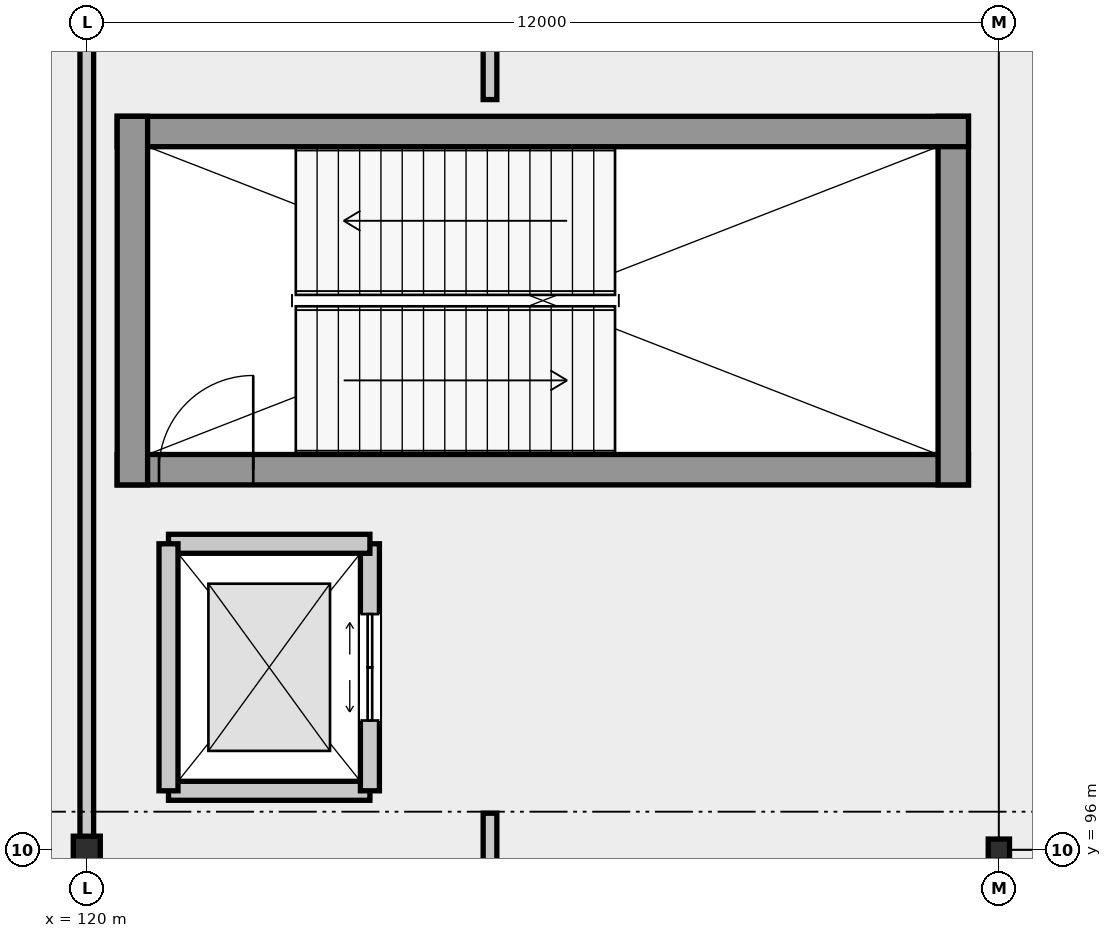
"""IFC4 building model, lengths in metres.
Left out: names, types, materials, properties, quantities, classifications, styles, units other than length and angle.
Written with IfcOpenShell. Run it as: python <this file> out.ifc"""

import sys

from ifc_helpers import new_model, si_unit, direction, frame, frame_2d, origin, origin_2d, place, context, subcontext, project, spatial, rectangle, hollow_circle, i_section, extrude, element, fill, save


model = new_model("IFC4")
c1 = context("Model", 3, precision=1e-05, world=origin(), true_north=direction((0.0, 1.0)))
c2 = subcontext(c1, "Body", "Model", "MODEL_VIEW")
j1 = project(units=[si_unit("LENGTHUNIT", "METRE"), si_unit("PLANEANGLEUNIT", "RADIAN")], contexts=[c1])
p1 = place(None, origin())
s1 = spatial("IfcSite", under=j1, at=p1, CompositionType="ELEMENT")
p2 = place(p1, origin())
s2 = spatial("IfcBuilding", under=s1, at=p2, CompositionType="ELEMENT")
p3 = place(p2, frame((0.0, 0.0, 10.8)))
s3 = spatial("IfcBuildingStorey", under=s2, at=p3, CompositionType="ELEMENT", Elevation=10.8)
p4 = place(p3, frame((120.0, 96.0, 0.0), z_axis=(0.0, 0.0, 1.0), x_axis=(1.0, 0.0, 0.0)))
e1 = element("IfcColumn", 1, at=p4, inside=s3, PredefinedType="COLUMN", context=c2, shape_type="SweptSolid", body=[
    extrude(hollow_circle(Radius=0.178, WallThickness=0.016, at=origin_2d()), origin(), (0.0, 0.0, 1.0), 6.0),
])
p5 = place(p3, frame((132.0, 96.0, 0.0), z_axis=(0.0, 0.0, 1.0), x_axis=(1.0, 0.0, 0.0)))
e2 = element("IfcColumn", 2, at=p5, inside=s3, PredefinedType="COLUMN", context=c2, shape_type="SweptSolid", body=[
    extrude(i_section(OverallWidth=0.28, OverallDepth=0.28, WebThickness=0.01, FlangeThickness=0.018, FilletRadius=0.024, at=origin_2d()), origin(), (0.0, 0.0, 1.0), 6.0),
])
p6 = place(p3, frame((120.4, 101.0, 0.0), z_axis=(0.0, 0.0, 1.0), x_axis=(1.0, 0.0, 0.0)))
e3 = element("IfcWall", 3, at=p6, inside=s3, PredefinedType="SHEAR", context=c2, shape_type="SweptSolid", body=[
    extrude(rectangle(XDim=11.2, YDim=0.4, at=frame_2d((5.6, 0.0))), origin(), (0.0, 0.0, 1.0), 5.69),
])
p7 = place(p6, frame((0.55, 0.0, 0.0)))
e4 = element("IfcOpeningElement", 4, at=p7, cuts=e3, PredefinedType="OPENING", context=c2, shape_type="SweptSolid", body=[
    extrude(rectangle(XDim=1.24, YDim=2.25, at=frame_2d((0.62, 1.125))), frame((0.0, 0.21, 0.0), z_axis=(0.0, -1.0, 0.0), x_axis=(1.0, 0.0, 0.0)), (0.0, 0.0, 1.0), 0.42),
])
p8 = place(p3, frame((131.4, 100.8, 0.0), z_axis=(0.0, 0.0, 1.0), x_axis=(0.0, 1.0, 0.0)))
e5 = element("IfcWall", 5, at=p8, inside=s3, PredefinedType="SHEAR", context=c2, shape_type="SweptSolid", body=[
    extrude(rectangle(XDim=4.85, YDim=0.4, at=frame_2d((2.425, 0.0))), origin(), (0.0, 0.0, 1.0), 5.69),
])
p9 = place(p3, frame((131.6, 105.45, 0.0), z_axis=(0.0, 0.0, 1.0), x_axis=(-1.0, 0.0, 0.0)))
e6 = element("IfcWall", 6, at=p9, inside=s3, PredefinedType="SHEAR", context=c2, shape_type="SweptSolid", body=[
    extrude(rectangle(XDim=11.2, YDim=0.4, at=frame_2d((5.6, 0.0))), origin(), (0.0, 0.0, 1.0), 5.69),
])
p10 = place(p3, frame((120.6, 105.65, 0.0), z_axis=(0.0, 0.0, 1.0), x_axis=(0.0, -1.0, 0.0)))
e7 = element("IfcWall", 7, at=p10, inside=s3, PredefinedType="SHEAR", context=c2, shape_type="SweptSolid", body=[
    extrude(rectangle(XDim=4.85, YDim=0.4, at=frame_2d((2.425, 0.0))), origin(), (0.0, 0.0, 1.0), 5.69),
])
p11 = place(p3, frame((121.075, 96.775, 0.0), z_axis=(0.0, 0.0, 1.0), x_axis=(1.0, 0.0, 0.0)))
e8 = element("IfcWall", 8, at=p11, inside=s3, PredefinedType="SOLIDWALL", context=c2, shape_type="SweptSolid", body=[
    extrude(rectangle(XDim=2.65, YDim=0.25, at=frame_2d((1.325, 0.0))), origin(), (0.0, 0.0, 1.0), 5.69),
])
p12 = place(p3, frame((123.725, 96.775, 0.0), z_axis=(0.0, 0.0, 1.0), x_axis=(0.0, 1.0, 0.0)))
e9 = element("IfcWall", 9, at=p12, inside=s3, PredefinedType="SOLIDWALL", context=c2, shape_type="SweptSolid", body=[
    extrude(rectangle(XDim=3.25, YDim=0.25, at=frame_2d((1.625, 0.0))), origin(), (0.0, 0.0, 1.0), 5.69),
])
p13 = place(p12, frame((0.925, 0.0, 0.0)))
e10 = element("IfcOpeningElement", 10, at=p13, cuts=e9, PredefinedType="OPENING", context=c2, shape_type="SweptSolid", body=[
    extrude(rectangle(XDim=1.4, YDim=2.3, at=frame_2d((0.7, 1.15))), frame((0.0, 0.135, 0.0), z_axis=(0.0, -1.0, 0.0), x_axis=(1.0, 0.0, 0.0)), (0.0, 0.0, 1.0), 0.27),
])
p14 = place(p3, frame((123.725, 100.025, 0.0), z_axis=(0.0, 0.0, 1.0), x_axis=(-1.0, 0.0, 0.0)))
e11 = element("IfcWall", 11, at=p14, inside=s3, PredefinedType="SOLIDWALL", context=c2, shape_type="SweptSolid", body=[
    extrude(rectangle(XDim=2.65, YDim=0.25, at=frame_2d((1.325, 0.0))), origin(), (0.0, 0.0, 1.0), 5.69),
])
p15 = place(p3, frame((121.075, 100.025, 0.0), z_axis=(0.0, 0.0, 1.0), x_axis=(0.0, -1.0, 0.0)))
e12 = element("IfcWall", 12, at=p15, inside=s3, PredefinedType="SOLIDWALL", context=c2, shape_type="SweptSolid", body=[
    extrude(rectangle(XDim=3.25, YDim=0.25, at=frame_2d((1.625, 0.0))), origin(), (0.0, 0.0, 1.0), 5.69),
])
p16 = place(p3, frame((120.0, 84.594, 0.0), z_axis=(0.0, 0.0, 1.0), x_axis=(0.0, 1.0, 0.0)))
e13 = element("IfcWall", 13, at=p16, inside=s3, PredefinedType="PARTITIONING", context=c2, shape_type="SweptSolid", body=[
    extrude(rectangle(XDim=22.848, YDim=0.18, at=frame_2d((11.424, 0.0))), origin(), (0.0, 0.0, 1.0), 5.18),
])
p17 = place(p16, frame((4.452, 0.0, 0.0)))
e14 = element("IfcOpeningElement", 14, at=p17, cuts=e13, PredefinedType="OPENING", context=c2, shape_type="SweptSolid", body=[
    extrude(rectangle(XDim=1.15, YDim=2.25, at=frame_2d((0.575, 1.125))), frame((0.0, 0.1, 0.0), z_axis=(0.0, -1.0, 0.0), x_axis=(1.0, 0.0, 0.0)), (0.0, 0.0, 1.0), 0.2),
])
p18 = place(p3, frame((125.305, 93.87, 0.0), z_axis=(0.0, 0.0, 1.0), x_axis=(0.0, 1.0, 0.0)))
e15 = element("IfcWall", 15, at=p18, inside=s3, PredefinedType="PARTITIONING", context=c2, shape_type="SweptSolid", body=[
    extrude(rectangle(XDim=2.61, YDim=0.18, at=frame_2d((1.305, 0.0))), origin(), (0.0, 0.0, 1.0), 5.18),
])
p19 = place(p18, frame((0.65, 0.0, 0.0)))
e16 = element("IfcOpeningElement", 16, at=p19, cuts=e15, PredefinedType="OPENING", context=c2, shape_type="SweptSolid", body=[
    extrude(rectangle(XDim=0.92, YDim=2.15, at=frame_2d((0.46, 1.075))), frame((0.0, 0.1, 0.0), z_axis=(0.0, -1.0, 0.0), x_axis=(1.0, 0.0, 0.0)), (0.0, 0.0, 1.0), 0.2),
])
p20 = place(p3, frame((125.305, 105.87, 0.0), z_axis=(0.0, 0.0, 1.0), x_axis=(0.0, 1.0, 0.0)))
e17 = element("IfcWall", 17, at=p20, inside=s3, PredefinedType="PARTITIONING", context=c2, shape_type="SweptSolid", body=[
    extrude(rectangle(XDim=1.75, YDim=0.18, at=frame_2d((0.875, 0.0))), origin(), (0.0, 0.0, 1.0), 5.67),
])
p21 = place(p7, origin())
e18 = element("IfcDoor", 18, at=p21, inside=s3, OperationType="SINGLE_SWING_RIGHT", PredefinedType="DOOR", context=c2, shape_type="SweptSolid", body=[
    extrude(rectangle(XDim=1.24, YDim=2.25, at=frame_2d((0.62, 1.125))), frame((0.0, 0.025, 0.0), z_axis=(0.0, -1.0, 0.0), x_axis=(1.0, 0.0, 0.0)), (0.0, 0.0, 1.0), 0.05),
])
fill(e4, e18)
p22 = place(p13, origin())
e19 = element("IfcDoor", 19, at=p22, inside=s3, OperationType="SLIDING_TO_LEFT", PredefinedType="DOOR", context=c2, shape_type="SweptSolid", body=[
    extrude(rectangle(XDim=1.4, YDim=2.3, at=frame_2d((0.7, 1.15))), frame((0.0, 0.025, 0.0), z_axis=(0.0, -1.0, 0.0), x_axis=(1.0, 0.0, 0.0)), (0.0, 0.0, 1.0), 0.05),
])
fill(e10, e19)
save(model, sys.argv[1])
